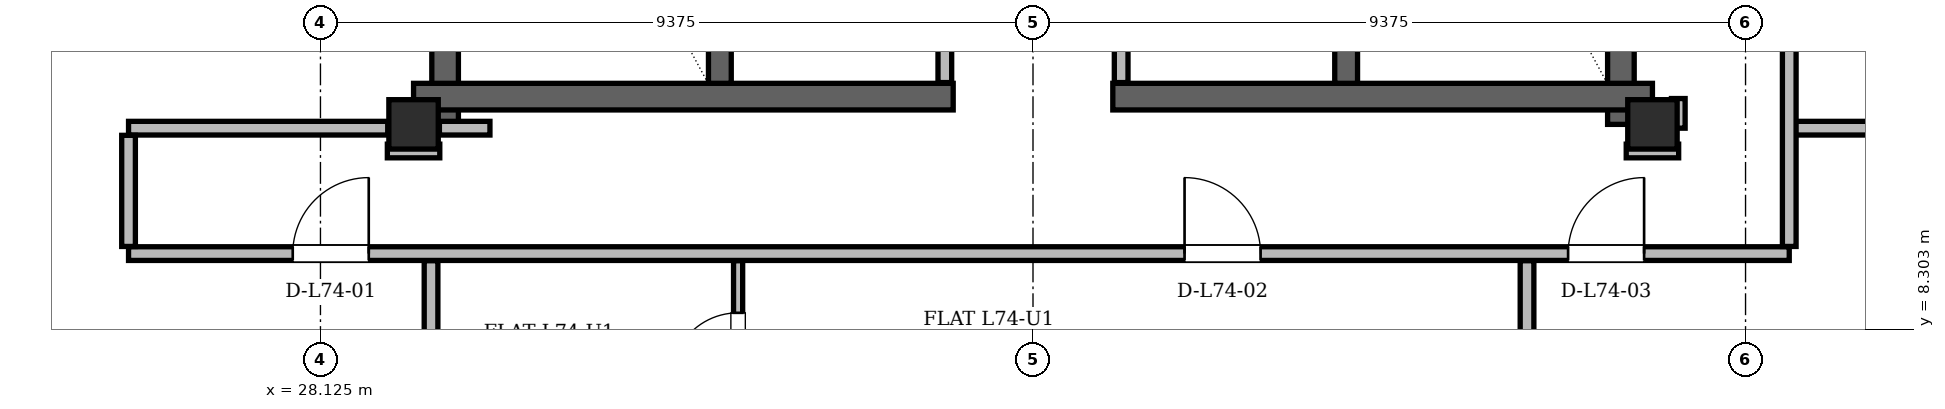
"""IFC4 building model, lengths in metres.
Left out: names, types, materials, properties, quantities, classifications, styles, units other than length and angle.
Written with IfcOpenShell. Run it as: python <this file> out.ifc"""

import sys

from ifc_helpers import new_model, si_unit, direction, frame, frame_2d, origin, origin_2d, place, context, subcontext, project, spatial, rectangle, hollow_rectangle, extrude, element, fill, save


model = new_model("IFC4")
c1 = context("Model", 3, precision=1e-05, world=origin(), true_north=direction((0.0, 1.0)))
c2 = subcontext(c1, "Body", "Model", "MODEL_VIEW")
j1 = project(units=[si_unit("LENGTHUNIT", "METRE"), si_unit("PLANEANGLEUNIT", "RADIAN")], contexts=[c1])
p1 = place(None, origin())
s1 = spatial("IfcSite", under=j1, at=p1, CompositionType="ELEMENT")
p2 = place(p1, origin())
s2 = spatial("IfcBuilding", under=s1, at=p2, CompositionType="ELEMENT")
p3 = place(p2, frame((0.0, 0.0, 281.1)))
s3 = spatial("IfcBuildingStorey", under=s2, at=p3, CompositionType="ELEMENT", Elevation=281.1)
for number, where, z_axis, x_axis in (
    (1, (29.35, 11.0, 0.0), (0.0, 0.0, 1.0), (1.0, 0.0, 0.0)),
    (2, (45.65, 11.0, 0.0), (0.0, 0.0, 1.0), (1.0, 0.0, 0.0)),
):
    element("IfcColumn", number, at=place(p3, frame(where, z_axis=z_axis, x_axis=x_axis)), inside=s3, PredefinedType="COLUMN", context=c2, shape_type="SweptSolid", body=[
        extrude(hollow_rectangle(XDim=0.65, YDim=0.65, WallThickness=0.05, at=origin_2d()), origin(), (0.0, 0.0, 1.0), 3.9),
    ])
for number, where, z_axis, x_axis in (
    (3, (29.765, 11.0, 0.0), (0.0, 0.0, 1.0), (0.0, 1.0, 0.0)),
    (4, (45.235, 11.0, 0.0), (0.0, 0.0, 1.0), (0.0, 1.0, 0.0)),
):
    element("IfcWall", number, at=place(p3, frame(where, z_axis=z_axis, x_axis=x_axis)), inside=s3, PredefinedType="SHEAR", context=c2, shape_type="SweptSolid", body=[
        extrude(rectangle(XDim=13.3, YDim=0.35, at=frame_2d((6.65, 0.0))), origin(), (0.0, 0.0, 1.0), 3.68),
    ])
for number, where, z_axis, x_axis in (
    (5, (29.35, 11.365, 0.0), (0.0, 0.0, 1.0), (1.0, 0.0, 0.0)),
    (6, (38.55, 11.365, 0.0), (0.0, 0.0, 1.0), (1.0, 0.0, 0.0)),
):
    element("IfcWall", number, at=place(p3, frame(where, z_axis=z_axis, x_axis=x_axis)), inside=s3, PredefinedType="SHEAR", context=c2, shape_type="SweptSolid", body=[
        extrude(rectangle(XDim=7.1, YDim=0.35, at=frame_2d((3.55, 0.0))), origin(), (0.0, 0.0, 1.0), 3.68),
    ])
for number, where, z_axis, x_axis in (
    (7, (33.38, 11.54, 0.0), (0.0, 0.0, 1.0), (0.0, 1.0, 0.0)),
    (8, (41.62, 11.54, 0.0), (0.0, 0.0, 1.0), (0.0, 1.0, 0.0)),
):
    element("IfcWall", number, at=place(p3, frame(where, z_axis=z_axis, x_axis=x_axis)), inside=s3, PredefinedType="SHEAR", context=c2, shape_type="SweptSolid", body=[
        extrude(rectangle(XDim=7.62, YDim=0.3, at=frame_2d((3.81, 0.0))), origin(), (0.0, 0.0, 1.0), 3.68),
    ])
p4 = place(p3, frame((58.454, 10.584, 0.0), z_axis=(0.0, 0.0, 1.0), x_axis=(-0.500002460556, 0.866023983177, 0.0)))
e9 = element("IfcWall", 9, at=p4, inside=s3, PredefinedType="SOLIDWALL", context=c2, shape_type="SweptSolid", body=[
    extrude(rectangle(XDim=37.435, YDim=0.29, at=frame_2d((18.718, 0.0))), origin(), (0.0, 0.0, 1.0), 3.058),
])
p5 = place(p4, frame((3.639, 0.0, 0.0)))
e10 = element("IfcOpeningElement", 10, at=p5, cuts=e9, PredefinedType="OPENING", context=c2, shape_type="SweptSolid", body=[
    extrude(rectangle(XDim=1.5, YDim=2.2, at=frame_2d((0.75, 1.1))), frame((0.0, 0.145, 0.0), z_axis=(0.0, -1.0, 0.0), x_axis=(1.0, 0.0, 0.0)), (0.0, 0.0, 1.0), 0.29),
])
p6 = place(p4, frame((27.901, 0.0, 0.0)))
e11 = element("IfcOpeningElement", 11, at=p6, cuts=e9, PredefinedType="OPENING", context=c2, shape_type="SweptSolid", body=[
    extrude(rectangle(XDim=1.5, YDim=2.2, at=frame_2d((0.75, 1.1))), frame((0.0, 0.145, 0.0), z_axis=(0.0, -1.0, 0.0), x_axis=(1.0, 0.0, 0.0)), (0.0, 0.0, 1.0), 0.29),
])
p7 = place(p4, frame((0.782, 0.0, 0.85)))
e12 = element("IfcOpeningElement", 12, at=p7, cuts=e9, PredefinedType="OPENING", context=c2, shape_type="SweptSolid", body=[
    extrude(rectangle(XDim=1.2, YDim=1.48, at=frame_2d((0.6, 0.74))), frame((0.0, 0.145, 0.0), z_axis=(0.0, -1.0, 0.0), x_axis=(1.0, 0.0, 0.0)), (0.0, 0.0, 1.0), 0.29),
])
p8 = place(p4, frame((7.149, 0.0, 0.85)))
e13 = element("IfcOpeningElement", 13, at=p8, cuts=e9, PredefinedType="OPENING", context=c2, shape_type="SweptSolid", body=[
    extrude(rectangle(XDim=2.4, YDim=1.9, at=frame_2d((1.2, 0.95))), frame((0.0, 0.145, 0.0), z_axis=(0.0, -1.0, 0.0), x_axis=(1.0, 0.0, 0.0)), (0.0, 0.0, 1.0), 0.29),
])
p9 = place(p4, frame((35.38, 0.0, 0.85)))
e14 = element("IfcOpeningElement", 14, at=p9, cuts=e9, PredefinedType="OPENING", context=c2, shape_type="SweptSolid", body=[
    extrude(rectangle(XDim=1.2, YDim=1.48, at=frame_2d((0.6, 0.74))), frame((0.0, 0.145, 0.0), z_axis=(0.0, -1.0, 0.0), x_axis=(1.0, 0.0, 0.0)), (0.0, 0.0, 1.0), 0.29),
])
p10 = place(p4, frame((16.994, 0.0, 0.85)))
e15 = element("IfcOpeningElement", 15, at=p10, cuts=e9, PredefinedType="OPENING", context=c2, shape_type="SweptSolid", body=[
    extrude(rectangle(XDim=1.2, YDim=1.48, at=frame_2d((0.6, 0.74))), frame((0.0, 0.145, 0.0), z_axis=(0.0, -1.0, 0.0), x_axis=(1.0, 0.0, 0.0)), (0.0, 0.0, 1.0), 0.29),
])
p11 = place(p4, frame((19.423, 0.0, 0.85)))
e16 = element("IfcOpeningElement", 16, at=p11, cuts=e9, PredefinedType="OPENING", context=c2, shape_type="SweptSolid", body=[
    extrude(rectangle(XDim=1.8, YDim=1.75, at=frame_2d((0.9, 0.875))), frame((0.0, 0.145, 0.0), z_axis=(0.0, -1.0, 0.0), x_axis=(1.0, 0.0, 0.0)), (0.0, 0.0, 1.0), 0.29),
])
p12 = place(p4, frame((22.626, 0.0, 0.85)))
e17 = element("IfcOpeningElement", 17, at=p12, cuts=e9, PredefinedType="OPENING", context=c2, shape_type="SweptSolid", body=[
    extrude(rectangle(XDim=2.2, YDim=1.85, at=frame_2d((1.1, 0.925))), frame((0.0, 0.145, 0.0), z_axis=(0.0, -1.0, 0.0), x_axis=(1.0, 0.0, 0.0)), (0.0, 0.0, 1.0), 0.29),
])
p13 = place(p4, frame((14.598, 0.0, 0.85)))
e18 = element("IfcOpeningElement", 18, at=p13, cuts=e9, PredefinedType="OPENING", context=c2, shape_type="SweptSolid", body=[
    extrude(rectangle(XDim=1.2, YDim=1.48, at=frame_2d((0.6, 0.74))), frame((0.0, 0.145, 0.0), z_axis=(0.0, -1.0, 0.0), x_axis=(1.0, 0.0, 0.0)), (0.0, 0.0, 1.0), 0.29),
])
p14 = place(p3, frame((35.264, 43.004, 0.0), z_axis=(0.0, 0.0, 1.0), x_axis=(-0.500002460556, -0.866023983177, 0.0)))
e19 = element("IfcWall", 19, at=p14, inside=s3, PredefinedType="SOLIDWALL", context=c2, shape_type="SweptSolid", body=[
    extrude(rectangle(XDim=37.435, YDim=0.29, at=frame_2d((18.718, 0.0))), origin(), (0.0, 0.0, 1.0), 3.058),
])
p15 = place(p14, frame((3.639, 0.0, 0.0)))
e20 = element("IfcOpeningElement", 20, at=p15, cuts=e19, PredefinedType="OPENING", context=c2, shape_type="SweptSolid", body=[
    extrude(rectangle(XDim=1.5, YDim=2.2, at=frame_2d((0.75, 1.1))), frame((0.0, 0.145, 0.0), z_axis=(0.0, -1.0, 0.0), x_axis=(1.0, 0.0, 0.0)), (0.0, 0.0, 1.0), 0.29),
])
p16 = place(p14, frame((27.481, 0.0, 0.0)))
e21 = element("IfcOpeningElement", 21, at=p16, cuts=e19, PredefinedType="OPENING", context=c2, shape_type="SweptSolid", body=[
    extrude(rectangle(XDim=1.5, YDim=2.2, at=frame_2d((0.75, 1.1))), frame((0.0, 0.145, 0.0), z_axis=(0.0, -1.0, 0.0), x_axis=(1.0, 0.0, 0.0)), (0.0, 0.0, 1.0), 0.29),
])
p17 = place(p14, frame((35.251, 0.0, 0.85)))
e22 = element("IfcOpeningElement", 22, at=p17, cuts=e19, PredefinedType="OPENING", context=c2, shape_type="SweptSolid", body=[
    extrude(rectangle(XDim=1.2, YDim=1.48, at=frame_2d((0.6, 0.74))), frame((0.0, 0.145, 0.0), z_axis=(0.0, -1.0, 0.0), x_axis=(1.0, 0.0, 0.0)), (0.0, 0.0, 1.0), 0.29),
])
p18 = place(p14, frame((29.441, 0.0, 0.85)))
e23 = element("IfcOpeningElement", 23, at=p18, cuts=e19, PredefinedType="OPENING", context=c2, shape_type="SweptSolid", body=[
    extrude(rectangle(XDim=1.2, YDim=1.48, at=frame_2d((0.6, 0.74))), frame((0.0, 0.145, 0.0), z_axis=(0.0, -1.0, 0.0), x_axis=(1.0, 0.0, 0.0)), (0.0, 0.0, 1.0), 0.29),
])
p19 = place(p14, frame((32.709, 0.0, 0.85)))
e24 = element("IfcOpeningElement", 24, at=p19, cuts=e19, PredefinedType="OPENING", context=c2, shape_type="SweptSolid", body=[
    extrude(rectangle(XDim=1.2, YDim=1.48, at=frame_2d((0.6, 0.74))), frame((0.0, 0.145, 0.0), z_axis=(0.0, -1.0, 0.0), x_axis=(1.0, 0.0, 0.0)), (0.0, 0.0, 1.0), 0.29),
])
p20 = place(p14, frame((20.345, 0.0, 0.85)))
e25 = element("IfcOpeningElement", 25, at=p20, cuts=e19, PredefinedType="OPENING", context=c2, shape_type="SweptSolid", body=[
    extrude(rectangle(XDim=1.2, YDim=1.48, at=frame_2d((0.6, 0.74))), frame((0.0, 0.145, 0.0), z_axis=(0.0, -1.0, 0.0), x_axis=(1.0, 0.0, 0.0)), (0.0, 0.0, 1.0), 0.29),
])
p21 = place(p14, frame((22.614, 0.0, 0.85)))
e26 = element("IfcOpeningElement", 26, at=p21, cuts=e19, PredefinedType="OPENING", context=c2, shape_type="SweptSolid", body=[
    extrude(rectangle(XDim=1.2, YDim=1.48, at=frame_2d((0.6, 0.74))), frame((0.0, 0.145, 0.0), z_axis=(0.0, -1.0, 0.0), x_axis=(1.0, 0.0, 0.0)), (0.0, 0.0, 1.0), 0.29),
])
p22 = place(p14, frame((1.862, 0.0, 0.85)))
e27 = element("IfcOpeningElement", 27, at=p22, cuts=e19, PredefinedType="OPENING", context=c2, shape_type="SweptSolid", body=[
    extrude(rectangle(XDim=1.2, YDim=1.48, at=frame_2d((0.6, 0.74))), frame((0.0, 0.145, 0.0), z_axis=(0.0, -1.0, 0.0), x_axis=(1.0, 0.0, 0.0)), (0.0, 0.0, 1.0), 0.29),
])
p23 = place(p14, frame((8.825, 0.0, 0.85)))
e28 = element("IfcOpeningElement", 28, at=p23, cuts=e19, PredefinedType="OPENING", context=c2, shape_type="SweptSolid", body=[
    extrude(rectangle(XDim=1.2, YDim=1.48, at=frame_2d((0.6, 0.74))), frame((0.0, 0.145, 0.0), z_axis=(0.0, -1.0, 0.0), x_axis=(1.0, 0.0, 0.0)), (0.0, 0.0, 1.0), 0.29),
])
p24 = place(p3, frame((36.34, 11.55, 0.0), z_axis=(0.0, 0.0, 1.0), x_axis=(0.0, 1.0, 0.0)))
e29 = element("IfcWall", 29, at=p24, inside=s3, PredefinedType="PARTITIONING", context=c2, shape_type="SweptSolid", body=[
    extrude(rectangle(XDim=5.55, YDim=0.18, at=frame_2d((2.775, 0.0))), origin(), (0.0, 0.0, 1.0), 3.68),
])
p25 = place(p24, frame((2.85, 0.0, 0.0)))
e30 = element("IfcOpeningElement", 30, at=p25, cuts=e29, PredefinedType="OPENING", context=c2, shape_type="SweptSolid", body=[
    extrude(rectangle(XDim=0.95, YDim=2.1, at=frame_2d((0.475, 1.05))), frame((0.0, 0.09, 0.0), z_axis=(0.0, -1.0, 0.0), x_axis=(1.0, 0.0, 0.0)), (0.0, 0.0, 1.0), 0.18),
])
p26 = place(p3, frame((38.66, 11.55, 0.0), z_axis=(0.0, 0.0, 1.0), x_axis=(0.0, 1.0, 0.0)))
e31 = element("IfcWall", 31, at=p26, inside=s3, PredefinedType="PARTITIONING", context=c2, shape_type="SweptSolid", body=[
    extrude(rectangle(XDim=5.55, YDim=0.18, at=frame_2d((2.775, 0.0))), origin(), (0.0, 0.0, 1.0), 3.68),
])
p27 = place(p26, frame((3.15, 0.0, 0.0)))
e32 = element("IfcOpeningElement", 32, at=p27, cuts=e31, PredefinedType="OPENING", context=c2, shape_type="SweptSolid", body=[
    extrude(rectangle(XDim=0.95, YDim=2.1, at=frame_2d((0.475, 1.05))), frame((0.0, 0.09, 0.0), z_axis=(0.0, -1.0, 0.0), x_axis=(1.0, 0.0, 0.0)), (0.0, 0.0, 1.0), 0.18),
])
p28 = place(p3, frame((25.6, 9.3, 0.0), z_axis=(0.0, 0.0, 1.0), x_axis=(1.0, 0.0, 0.0)))
e33 = element("IfcWall", 33, at=p28, inside=s3, PredefinedType="PARTITIONING", context=c2, shape_type="SweptSolid", body=[
    extrude(rectangle(XDim=21.85, YDim=0.18, at=frame_2d((10.925, 0.0))), origin(), (0.0, 0.0, 1.0), 3.68),
])
p29 = place(p28, frame((2.16, 0.0, 0.0)))
e34 = element("IfcOpeningElement", 34, at=p29, cuts=e33, PredefinedType="OPENING", context=c2, shape_type="SweptSolid", body=[
    extrude(rectangle(XDim=1.0, YDim=2.18, at=frame_2d((0.5, 1.09))), frame((0.0, 0.09, 0.0), z_axis=(0.0, -1.0, 0.0), x_axis=(1.0, 0.0, 0.0)), (0.0, 0.0, 1.0), 0.18),
])
p30 = place(p28, frame((13.894, 0.0, 0.0)))
e35 = element("IfcOpeningElement", 35, at=p30, cuts=e33, PredefinedType="OPENING", context=c2, shape_type="SweptSolid", body=[
    extrude(rectangle(XDim=1.0, YDim=2.18, at=frame_2d((0.5, 1.09))), frame((0.0, 0.09, 0.0), z_axis=(0.0, -1.0, 0.0), x_axis=(1.0, 0.0, 0.0)), (0.0, 0.0, 1.0), 0.18),
])
p31 = place(p28, frame((18.94, 0.0, 0.0)))
e36 = element("IfcOpeningElement", 36, at=p31, cuts=e33, PredefinedType="OPENING", context=c2, shape_type="SweptSolid", body=[
    extrude(rectangle(XDim=1.0, YDim=2.18, at=frame_2d((0.5, 1.09))), frame((0.0, 0.09, 0.0), z_axis=(0.0, -1.0, 0.0), x_axis=(1.0, 0.0, 0.0)), (0.0, 0.0, 1.0), 0.18),
])
for number, where, z_axis, x_axis in (
    (37, (29.005, 10.65, 0.0), (0.0, 0.0, 1.0), (1.0, 0.0, 0.0)),
    (38, (45.305, 10.65, 0.0), (0.0, 0.0, 1.0), (1.0, 0.0, 0.0)),
):
    element("IfcWall", number, at=place(p3, frame(where, z_axis=z_axis, x_axis=x_axis)), inside=s3, PredefinedType="PARTITIONING", context=c2, shape_type="SweptSolid", body=[
        extrude(rectangle(XDim=0.69, YDim=0.18, at=frame_2d((0.345, 0.0))), origin(), (0.0, 0.0, 1.0), 3.68),
    ])
p32 = place(p3, frame((25.6, 10.95, 0.0), z_axis=(0.0, 0.0, 1.0), x_axis=(1.0, 0.0, 0.0)))
e39 = element("IfcWall", 39, at=p32, inside=s3, PredefinedType="PARTITIONING", context=c2, shape_type="SweptSolid", body=[
    extrude(rectangle(XDim=3.41, YDim=0.18, at=frame_2d((1.705, 0.0))), origin(), (0.0, 0.0, 1.0), 3.266),
])
p33 = place(p3, frame((29.69, 10.95, 0.0), z_axis=(0.0, 0.0, 1.0), x_axis=(1.0, 0.0, 0.0)))
e40 = element("IfcWall", 40, at=p33, inside=s3, PredefinedType="PARTITIONING", context=c2, shape_type="SweptSolid", body=[
    extrude(rectangle(XDim=0.665, YDim=0.18, at=frame_2d((0.333, 0.0))), origin(), (0.0, 0.0, 1.0), 2.82),
])
p34 = place(p3, frame((47.45, 10.95, 0.0), z_axis=(0.0, 0.0, 1.0), x_axis=(1.0, 0.0, 0.0)))
e41 = element("IfcWall", 41, at=p34, inside=s3, PredefinedType="PARTITIONING", context=c2, shape_type="SweptSolid", body=[
    extrude(rectangle(XDim=10.62, YDim=0.18, at=frame_2d((5.31, 0.0))), origin(), (0.0, 0.0, 1.0), 3.266),
])
p35 = place(p3, frame((25.6, 9.394, 0.0), z_axis=(0.0, 0.0, 1.0), x_axis=(0.0, 1.0, 0.0)))
e42 = element("IfcWall", 42, at=p35, inside=s3, PredefinedType="PARTITIONING", context=c2, shape_type="SweptSolid", body=[
    extrude(rectangle(XDim=1.462, YDim=0.18, at=frame_2d((0.731, 0.0))), origin(), (0.0, 0.0, 1.0), 3.266),
])
p36 = place(p3, frame((29.58, 6.861, 0.0), z_axis=(0.0, 0.0, 1.0), x_axis=(0.0, 1.0, 0.0)))
e43 = element("IfcWall", 43, at=p36, inside=s3, PredefinedType="PARTITIONING", context=c2, shape_type="SweptSolid", body=[
    extrude(rectangle(XDim=2.345, YDim=0.18, at=frame_2d((1.173, 0.0))), origin(), (0.0, 0.0, 1.0), 3.68),
])
p37 = place(p3, frame((33.62, 6.861, 0.0), z_axis=(0.0, 0.0, 1.0), x_axis=(0.0, 1.0, 0.0)))
e44 = element("IfcWall", 44, at=p37, inside=s3, PredefinedType="PARTITIONING", context=c2, shape_type="SweptSolid", body=[
    extrude(rectangle(XDim=2.345, YDim=0.12, at=frame_2d((1.173, 0.0))), origin(), (0.0, 0.0, 1.0), 3.68),
])
p38 = place(p37, frame((0.78, 0.0, 0.0)))
e45 = element("IfcOpeningElement", 45, at=p38, cuts=e44, PredefinedType="OPENING", context=c2, shape_type="SweptSolid", body=[
    extrude(rectangle(XDim=0.88, YDim=2.08, at=frame_2d((0.44, 1.04))), frame((0.0, 0.06, 0.0), z_axis=(0.0, -1.0, 0.0), x_axis=(1.0, 0.0, 0.0)), (0.0, 0.0, 1.0), 0.12),
])
p39 = place(p3, frame((44.0, 6.861, 0.0), z_axis=(0.0, 0.0, 1.0), x_axis=(0.0, 1.0, 0.0)))
e46 = element("IfcWall", 46, at=p39, inside=s3, PredefinedType="PARTITIONING", context=c2, shape_type="SweptSolid", body=[
    extrude(rectangle(XDim=2.345, YDim=0.18, at=frame_2d((1.173, 0.0))), origin(), (0.0, 0.0, 1.0), 3.68),
])
p40 = place(p3, frame((45.99, 10.95, 0.0), z_axis=(0.0, 0.0, 1.0), x_axis=(0.0, 1.0, 0.0)))
e47 = element("IfcWall", 47, at=p40, inside=s3, PredefinedType="PARTITIONING", context=c2, shape_type="SweptSolid", body=[
    extrude(rectangle(XDim=0.39, YDim=0.18, at=frame_2d((0.195, 0.0))), origin(), (0.0, 0.0, 1.0), 3.68),
])
p41 = place(p3, frame((47.45, 9.394, 0.0), z_axis=(0.0, 0.0, 1.0), x_axis=(0.0, 1.0, 0.0)))
e48 = element("IfcWall", 48, at=p41, inside=s3, PredefinedType="PARTITIONING", context=c2, shape_type="SweptSolid", body=[
    extrude(rectangle(XDim=16.482, YDim=0.18, at=frame_2d((8.241, 0.0))), origin(), (0.0, 0.0, 1.0), 3.266),
])
p42 = place(p41, frame((6.188, 0.0, 0.0)))
e49 = element("IfcOpeningElement", 49, at=p42, cuts=e48, PredefinedType="OPENING", context=c2, shape_type="SweptSolid", body=[
    extrude(rectangle(XDim=1.0, YDim=2.18, at=frame_2d((0.5, 1.09))), frame((0.0, 0.09, 0.0), z_axis=(0.0, -1.0, 0.0), x_axis=(1.0, 0.0, 0.0)), (0.0, 0.0, 1.0), 0.18),
])
p43 = place(p41, frame((12.749, 0.0, 0.0)))
e50 = element("IfcOpeningElement", 50, at=p43, cuts=e48, PredefinedType="OPENING", context=c2, shape_type="SweptSolid", body=[
    extrude(rectangle(XDim=1.0, YDim=2.18, at=frame_2d((0.5, 1.09))), frame((0.0, 0.09, 0.0), z_axis=(0.0, -1.0, 0.0), x_axis=(1.0, 0.0, 0.0)), (0.0, 0.0, 1.0), 0.18),
])
p44 = place(p29, origin())
e51 = element("IfcDoor", 51, at=p44, inside=s3, OperationType="SINGLE_SWING_RIGHT", PredefinedType="DOOR", context=c2, shape_type="SweptSolid", body=[
    extrude(rectangle(XDim=1.0, YDim=2.18, at=frame_2d((0.5, 1.09))), frame((0.0, 0.025, 0.0), z_axis=(0.0, -1.0, 0.0), x_axis=(1.0, 0.0, 0.0)), (0.0, 0.0, 1.0), 0.05),
])
fill(e34, e51)
p45 = place(p30, origin())
e52 = element("IfcDoor", 52, at=p45, inside=s3, OperationType="SINGLE_SWING_LEFT", PredefinedType="DOOR", context=c2, shape_type="SweptSolid", body=[
    extrude(rectangle(XDim=1.0, YDim=2.18, at=frame_2d((0.5, 1.09))), frame((0.0, 0.025, 0.0), z_axis=(0.0, -1.0, 0.0), x_axis=(1.0, 0.0, 0.0)), (0.0, 0.0, 1.0), 0.05),
])
fill(e35, e52)
p46 = place(p31, origin())
e53 = element("IfcDoor", 53, at=p46, inside=s3, OperationType="SINGLE_SWING_RIGHT", PredefinedType="DOOR", context=c2, shape_type="SweptSolid", body=[
    extrude(rectangle(XDim=1.0, YDim=2.18, at=frame_2d((0.5, 1.09))), frame((0.0, 0.025, 0.0), z_axis=(0.0, -1.0, 0.0), x_axis=(1.0, 0.0, 0.0)), (0.0, 0.0, 1.0), 0.05),
])
fill(e36, e53)
p47 = place(p38, origin())
e54 = element("IfcDoor", 54, at=p47, inside=s3, OperationType="SINGLE_SWING_LEFT", PredefinedType="DOOR", context=c2, shape_type="SweptSolid", body=[
    extrude(rectangle(XDim=0.88, YDim=2.08, at=frame_2d((0.44, 1.04))), frame((0.0, 0.025, 0.0), z_axis=(0.0, -1.0, 0.0), x_axis=(1.0, 0.0, 0.0)), (0.0, 0.0, 1.0), 0.05),
])
fill(e45, e54)
save(model, sys.argv[1])
